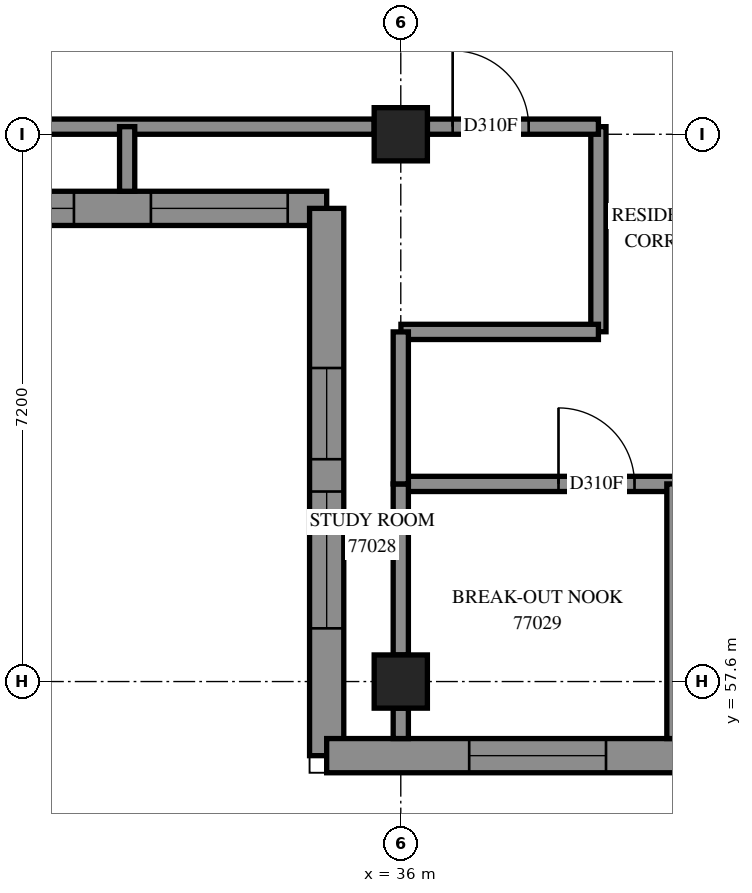
"""IFC4 building model, lengths in metres.
Left out: names, types, materials, properties, quantities, classifications, styles, units other than length and angle.
Written with IfcOpenShell. Run it as: python <this file> out.ifc"""

import sys

from ifc_helpers import new_model, si_unit, direction, frame, frame_2d, origin, origin_2d, place, context, subcontext, project, spatial, polyline, rectangle, outline, extrude, element, fill, save


model = new_model("IFC4")
c1 = context("Model", 3, precision=1e-05, world=origin(), true_north=direction((0.0, 1.0)))
c2 = subcontext(c1, "Body", "Model", "MODEL_VIEW")
j1 = project(units=[si_unit("LENGTHUNIT", "METRE"), si_unit("PLANEANGLEUNIT", "RADIAN")], contexts=[c1])
p1 = place(None, origin())
s1 = spatial("IfcSite", under=j1, at=p1, CompositionType="ELEMENT")
p2 = place(p1, origin())
s2 = spatial("IfcBuilding", under=s1, at=p2, CompositionType="ELEMENT")
p3 = place(p2, frame((0.0, 0.0, 281.2)))
s3 = spatial("IfcBuildingStorey", under=s2, at=p3, CompositionType="ELEMENT", Elevation=281.2)
for number, where, z_axis, x_axis in (
    (1, (36.0, 57.6, 0.0), (0.0, 0.0, 1.0), (1.0, 0.0, 0.0)),
    (2, (36.0, 64.8, 0.0), (0.0, 0.0, 1.0), (1.0, 0.0, 0.0)),
):
    element("IfcColumn", number, at=place(p3, frame(where, z_axis=z_axis, x_axis=x_axis)), inside=s3, PredefinedType="COLUMN", context=c2, shape_type="SweptSolid", body=[
        extrude(rectangle(XDim=0.7, YDim=0.7, at=origin_2d()), origin(), (0.0, 0.0, 1.0), 3.1),
    ])
p4 = place(p3, frame((26.592, 63.825, 0.0), z_axis=(0.0, 0.0, 1.0), x_axis=(1.0, 0.0, 0.0)))
e3 = element("IfcWall", 3, at=p4, inside=s3, PredefinedType="SOLIDWALL", context=c2, shape_type="SweptSolid", body=[
    extrude(outline(polyline([(-0.225, -0.225), (8.208, -0.225), (8.658, 0.225), (0.225, 0.225), (-0.225, -0.225)])), origin(), (0.0, 0.0, 1.0), 2.6),
])
p5 = place(p4, frame((3.308, 0.0, 0.6)))
e4 = element("IfcOpeningElement", 4, at=p5, cuts=e3, PredefinedType="OPENING", context=c2, shape_type="SweptSolid", body=[
    extrude(rectangle(XDim=1.8, YDim=1.9, at=frame_2d((0.9, 0.95))), frame((0.0, 0.235, 0.0), z_axis=(0.0, -1.0, 0.0), x_axis=(1.0, 0.0, 0.0)), (0.0, 0.0, 1.0), 0.47),
])
p6 = place(p4, frame((6.12, 0.0, 0.6)))
e5 = element("IfcOpeningElement", 5, at=p6, cuts=e3, PredefinedType="OPENING", context=c2, shape_type="SweptSolid", body=[
    extrude(rectangle(XDim=1.8, YDim=1.9, at=frame_2d((0.9, 0.95))), frame((0.0, 0.235, 0.0), z_axis=(0.0, -1.0, 0.0), x_axis=(1.0, 0.0, 0.0)), (0.0, 0.0, 1.0), 0.47),
])
p7 = place(p4, frame((0.717, 0.0, 0.6)))
e6 = element("IfcOpeningElement", 6, at=p7, cuts=e3, PredefinedType="OPENING", context=c2, shape_type="SweptSolid", body=[
    extrude(rectangle(XDim=1.2, YDim=1.9, at=frame_2d((0.6, 0.95))), frame((0.0, 0.235, 0.0), z_axis=(0.0, -1.0, 0.0), x_axis=(1.0, 0.0, 0.0)), (0.0, 0.0, 1.0), 0.47),
])
p8 = place(p3, frame((35.025, 63.825, 0.0), z_axis=(0.0, 0.0, 1.0), x_axis=(0.0, -1.0, 0.0)))
e7 = element("IfcWall", 7, at=p8, inside=s3, PredefinedType="SOLIDWALL", context=c2, shape_type="SweptSolid", body=[
    extrude(outline(polyline([(0.225, -0.225), (7.425, -0.225), (6.975, 0.225), (-0.225, 0.225), (0.225, -0.225)])), origin(), (0.0, 0.0, 1.0), 2.6),
])
p9 = place(p8, frame((3.725, 0.0, 0.6)))
e8 = element("IfcOpeningElement", 8, at=p9, cuts=e7, PredefinedType="OPENING", context=c2, shape_type="SweptSolid", body=[
    extrude(rectangle(XDim=1.8, YDim=1.9, at=frame_2d((0.9, 0.95))), frame((0.0, 0.235, 0.0), z_axis=(0.0, -1.0, 0.0), x_axis=(1.0, 0.0, 0.0)), (0.0, 0.0, 1.0), 0.47),
])
p10 = place(p8, frame((2.1, 0.0, 0.6)))
e9 = element("IfcOpeningElement", 9, at=p10, cuts=e7, PredefinedType="OPENING", context=c2, shape_type="SweptSolid", body=[
    extrude(rectangle(XDim=1.2, YDim=1.9, at=frame_2d((0.6, 0.95))), frame((0.0, 0.235, 0.0), z_axis=(0.0, -1.0, 0.0), x_axis=(1.0, 0.0, 0.0)), (0.0, 0.0, 1.0), 0.47),
])
p11 = place(p3, frame((35.025, 56.625, 0.0), z_axis=(0.0, 0.0, 1.0), x_axis=(1.0, 0.0, 0.0)))
e10 = element("IfcWall", 10, at=p11, inside=s3, PredefinedType="SOLIDWALL", context=c2, shape_type="SweptSolid", body=[
    extrude(outline(polyline([(-0.225, -0.225), (6.975, -0.225), (7.425, 0.225), (0.225, 0.225), (-0.225, -0.225)])), origin(), (0.0, 0.0, 1.0), 2.6),
])
p12 = place(p11, frame((1.875, 0.0, 0.6)))
e11 = element("IfcOpeningElement", 11, at=p12, cuts=e10, PredefinedType="OPENING", context=c2, shape_type="SweptSolid", body=[
    extrude(rectangle(XDim=1.8, YDim=1.9, at=frame_2d((0.9, 0.95))), frame((0.0, 0.235, 0.0), z_axis=(0.0, -1.0, 0.0), x_axis=(1.0, 0.0, 0.0)), (0.0, 0.0, 1.0), 0.47),
])
p13 = place(p11, frame((4.888, 0.0, 0.6)))
e12 = element("IfcOpeningElement", 12, at=p13, cuts=e10, PredefinedType="OPENING", context=c2, shape_type="SweptSolid", body=[
    extrude(rectangle(XDim=1.8, YDim=1.9, at=frame_2d((0.9, 0.95))), frame((0.0, 0.235, 0.0), z_axis=(0.0, -1.0, 0.0), x_axis=(1.0, 0.0, 0.0)), (0.0, 0.0, 1.0), 0.47),
])
p14 = place(p3, frame((36.0, 60.2, 0.0), z_axis=(0.0, 0.0, 1.0), x_axis=(1.0, 0.0, 0.0)))
e13 = element("IfcWall", 13, at=p14, inside=s3, PredefinedType="PARTITIONING", context=c2, shape_type="SweptSolid", body=[
    extrude(rectangle(XDim=17.0, YDim=0.2, at=frame_2d((8.5, 0.0))), origin(), (0.0, 0.0, 1.0), 3.1),
])
p15 = place(p14, frame((15.802, 0.0, 0.0)))
e14 = element("IfcOpeningElement", 14, at=p15, cuts=e13, PredefinedType="OPENING", context=c2, shape_type="SweptSolid", body=[
    extrude(rectangle(XDim=1.0, YDim=2.1, at=frame_2d((0.5, 1.05))), frame((0.0, 0.11, 0.0), z_axis=(0.0, -1.0, 0.0), x_axis=(1.0, 0.0, 0.0)), (0.0, 0.0, 1.0), 0.22),
])
p16 = place(p14, frame((2.075, 0.0, 0.0)))
e15 = element("IfcOpeningElement", 15, at=p16, cuts=e13, PredefinedType="OPENING", context=c2, shape_type="SweptSolid", body=[
    extrude(rectangle(XDim=1.0, YDim=2.1, at=frame_2d((0.5, 1.05))), frame((0.0, 0.11, 0.0), z_axis=(0.0, -1.0, 0.0), x_axis=(1.0, 0.0, 0.0)), (0.0, 0.0, 1.0), 0.22),
])
p17 = place(p14, frame((4.125, 0.0, 0.0)))
e16 = element("IfcOpeningElement", 16, at=p17, cuts=e13, PredefinedType="OPENING", context=c2, shape_type="SweptSolid", body=[
    extrude(rectangle(XDim=1.0, YDim=2.1, at=frame_2d((0.5, 1.05))), frame((0.0, 0.11, 0.0), z_axis=(0.0, -1.0, 0.0), x_axis=(1.0, 0.0, 0.0)), (0.0, 0.0, 1.0), 0.22),
])
p18 = place(p14, frame((9.275, 0.0, 0.0)))
e17 = element("IfcOpeningElement", 17, at=p18, cuts=e13, PredefinedType="OPENING", context=c2, shape_type="SweptSolid", body=[
    extrude(rectangle(XDim=1.0, YDim=2.1, at=frame_2d((0.5, 1.05))), frame((0.0, 0.11, 0.0), z_axis=(0.0, -1.0, 0.0), x_axis=(1.0, 0.0, 0.0)), (0.0, 0.0, 1.0), 0.22),
])
p19 = place(p14, frame((11.48, 0.0, 0.0)))
e18 = element("IfcOpeningElement", 18, at=p19, cuts=e13, PredefinedType="OPENING", context=c2, shape_type="SweptSolid", body=[
    extrude(rectangle(XDim=1.0, YDim=2.1, at=frame_2d((0.5, 1.05))), frame((0.0, 0.11, 0.0), z_axis=(0.0, -1.0, 0.0), x_axis=(1.0, 0.0, 0.0)), (0.0, 0.0, 1.0), 0.22),
])
p20 = place(p3, frame((29.15, 64.9, 0.0), z_axis=(0.0, 0.0, 1.0), x_axis=(1.0, 0.0, 0.0)))
e19 = element("IfcWall", 19, at=p20, inside=s3, PredefinedType="PARTITIONING", context=c2, shape_type="SweptSolid", body=[
    extrude(rectangle(XDim=6.5, YDim=0.2, at=frame_2d((3.25, 0.0))), origin(), (0.0, 0.0, 1.0), 2.6),
])
p21 = place(p3, frame((39.6, 56.85, 0.0), z_axis=(0.0, 0.0, 1.0), x_axis=(0.0, 1.0, 0.0)))
e20 = element("IfcWall", 20, at=p21, inside=s3, PredefinedType="PARTITIONING", context=c2, shape_type="SweptSolid", body=[
    extrude(rectangle(XDim=3.35, YDim=0.2, at=frame_2d((1.675, 0.0))), origin(), (0.0, 0.0, 1.0), 3.1),
])
p22 = place(p3, frame((38.6, 62.202, 0.0), z_axis=(0.0, 0.0, 1.0), x_axis=(0.0, 1.0, 0.0)))
e21 = element("IfcWall", 21, at=p22, inside=s3, PredefinedType="PARTITIONING", context=c2, shape_type="SweptSolid", body=[
    extrude(rectangle(XDim=2.698, YDim=0.2, at=frame_2d((1.349, 0.0))), origin(), (0.0, 0.0, 1.0), 3.1),
])
p23 = place(p3, frame((36.002, 62.2, 0.0), z_axis=(0.0, 0.0, 1.0), x_axis=(1.0, 0.0, 0.0)))
e22 = element("IfcWall", 22, at=p23, inside=s3, PredefinedType="PARTITIONING", context=c2, shape_type="SweptSolid", body=[
    extrude(rectangle(XDim=2.598, YDim=0.2, at=frame_2d((1.299, 0.0))), origin(), (0.0, 0.0, 1.0), 3.1),
])
p24 = place(p3, frame((36.35, 64.9, 0.0), z_axis=(0.0, 0.0, 1.0), x_axis=(1.0, 0.0, 0.0)))
e23 = element("IfcWall", 23, at=p24, inside=s3, PredefinedType="PARTITIONING", context=c2, shape_type="SweptSolid", body=[
    extrude(rectangle(XDim=2.25, YDim=0.2, at=frame_2d((1.125, 0.0))), origin(), (0.0, 0.0, 1.0), 3.1),
])
p25 = place(p24, frame((0.333, 0.0, 0.0)))
e24 = element("IfcOpeningElement", 24, at=p25, cuts=e23, PredefinedType="OPENING", context=c2, shape_type="SweptSolid", body=[
    extrude(rectangle(XDim=1.0, YDim=2.1, at=frame_2d((0.5, 1.05))), frame((0.0, 0.11, 0.0), z_axis=(0.0, -1.0, 0.0), x_axis=(1.0, 0.0, 0.0)), (0.0, 0.0, 1.0), 0.22),
])
p26 = place(p3, frame((36.0, 57.95, 0.0), z_axis=(0.0, 0.0, 1.0), x_axis=(0.0, 1.0, 0.0)))
e25 = element("IfcWall", 25, at=p26, inside=s3, PredefinedType="PARTITIONING", context=c2, shape_type="SweptSolid", body=[
    extrude(rectangle(XDim=2.25, YDim=0.2, at=frame_2d((1.125, 0.0))), origin(), (0.0, 0.0, 1.0), 2.6),
])
p27 = place(p3, frame((36.0, 60.2, 0.0), z_axis=(0.0, 0.0, 1.0), x_axis=(0.0, 1.0, 0.0)))
e26 = element("IfcWall", 26, at=p27, inside=s3, PredefinedType="PARTITIONING", context=c2, shape_type="SweptSolid", body=[
    extrude(rectangle(XDim=2.0, YDim=0.2, at=frame_2d((1.0, 0.0))), origin(), (0.0, 0.0, 1.0), 2.6),
])
p28 = place(p3, frame((32.4, 64.05, 0.0), z_axis=(0.0, 0.0, 1.0), x_axis=(0.0, 1.0, 0.0)))
e27 = element("IfcWall", 27, at=p28, inside=s3, PredefinedType="PARTITIONING", context=c2, shape_type="SweptSolid", body=[
    extrude(rectangle(XDim=0.85, YDim=0.2, at=frame_2d((0.425, 0.0))), origin(), (0.0, 0.0, 1.0), 3.1),
])
p29 = place(p3, frame((36.0, 56.85, 0.0), z_axis=(0.0, 0.0, 1.0), x_axis=(0.0, 1.0, 0.0)))
e28 = element("IfcWall", 28, at=p29, inside=s3, PredefinedType="PARTITIONING", context=c2, shape_type="SweptSolid", body=[
    extrude(rectangle(XDim=0.4, YDim=0.2, at=frame_2d((0.2, 0.0))), origin(), (0.0, 0.0, 1.0), 3.1),
])
p30 = place(p5, origin())
e29 = element("IfcWindow", 29, at=p30, inside=s3, PartitioningType="SINGLE_PANEL", PredefinedType="WINDOW", context=c2, shape_type="SweptSolid", body=[
    extrude(rectangle(XDim=1.8, YDim=1.9, at=frame_2d((0.9, 0.95))), frame((0.0, 0.205, 0.0), z_axis=(0.0, -1.0, 0.0), x_axis=(1.0, 0.0, 0.0)), (0.0, 0.0, 1.0), 0.06),
])
fill(e4, e29)
p31 = place(p6, origin())
e30 = element("IfcWindow", 30, at=p31, inside=s3, PartitioningType="SINGLE_PANEL", PredefinedType="WINDOW", context=c2, shape_type="SweptSolid", body=[
    extrude(rectangle(XDim=1.8, YDim=1.9, at=frame_2d((0.9, 0.95))), frame((0.0, 0.205, 0.0), z_axis=(0.0, -1.0, 0.0), x_axis=(1.0, 0.0, 0.0)), (0.0, 0.0, 1.0), 0.06),
])
fill(e5, e30)
p32 = place(p9, origin())
e31 = element("IfcWindow", 31, at=p32, inside=s3, PartitioningType="SINGLE_PANEL", PredefinedType="WINDOW", context=c2, shape_type="SweptSolid", body=[
    extrude(rectangle(XDim=1.8, YDim=1.9, at=frame_2d((0.9, 0.95))), frame((0.0, 0.205, 0.0), z_axis=(0.0, -1.0, 0.0), x_axis=(1.0, 0.0, 0.0)), (0.0, 0.0, 1.0), 0.06),
])
fill(e8, e31)
p33 = place(p12, origin())
e32 = element("IfcWindow", 32, at=p33, inside=s3, PartitioningType="SINGLE_PANEL", PredefinedType="WINDOW", context=c2, shape_type="SweptSolid", body=[
    extrude(rectangle(XDim=1.8, YDim=1.9, at=frame_2d((0.9, 0.95))), frame((0.0, 0.205, 0.0), z_axis=(0.0, -1.0, 0.0), x_axis=(1.0, 0.0, 0.0)), (0.0, 0.0, 1.0), 0.06),
])
fill(e11, e32)
p34 = place(p25, origin())
e33 = element("IfcDoor", 33, at=p34, inside=s3, OperationType="SINGLE_SWING_RIGHT", PredefinedType="DOOR", context=c2, shape_type="SweptSolid", body=[
    extrude(rectangle(XDim=1.0, YDim=2.1, at=frame_2d((0.5, 1.05))), frame((0.0, 0.025, 0.0), z_axis=(0.0, -1.0, 0.0), x_axis=(1.0, 0.0, 0.0)), (0.0, 0.0, 1.0), 0.05),
])
fill(e24, e33)
p35 = place(p16, origin())
e34 = element("IfcDoor", 34, at=p35, inside=s3, OperationType="SINGLE_SWING_LEFT", PredefinedType="DOOR", context=c2, shape_type="SweptSolid", body=[
    extrude(rectangle(XDim=1.0, YDim=2.1, at=frame_2d((0.5, 1.05))), frame((0.0, 0.025, 0.0), z_axis=(0.0, -1.0, 0.0), x_axis=(1.0, 0.0, 0.0)), (0.0, 0.0, 1.0), 0.05),
])
fill(e15, e34)
p36 = place(p10, origin())
e35 = element("IfcWindow", 35, at=p36, inside=s3, PartitioningType="SINGLE_PANEL", PredefinedType="WINDOW", context=c2, shape_type="SweptSolid", body=[
    extrude(rectangle(XDim=1.2, YDim=1.9, at=frame_2d((0.6, 0.95))), frame((0.0, 0.205, 0.0), z_axis=(0.0, -1.0, 0.0), x_axis=(1.0, 0.0, 0.0)), (0.0, 0.0, 1.0), 0.06),
])
fill(e9, e35)
save(model, sys.argv[1])
